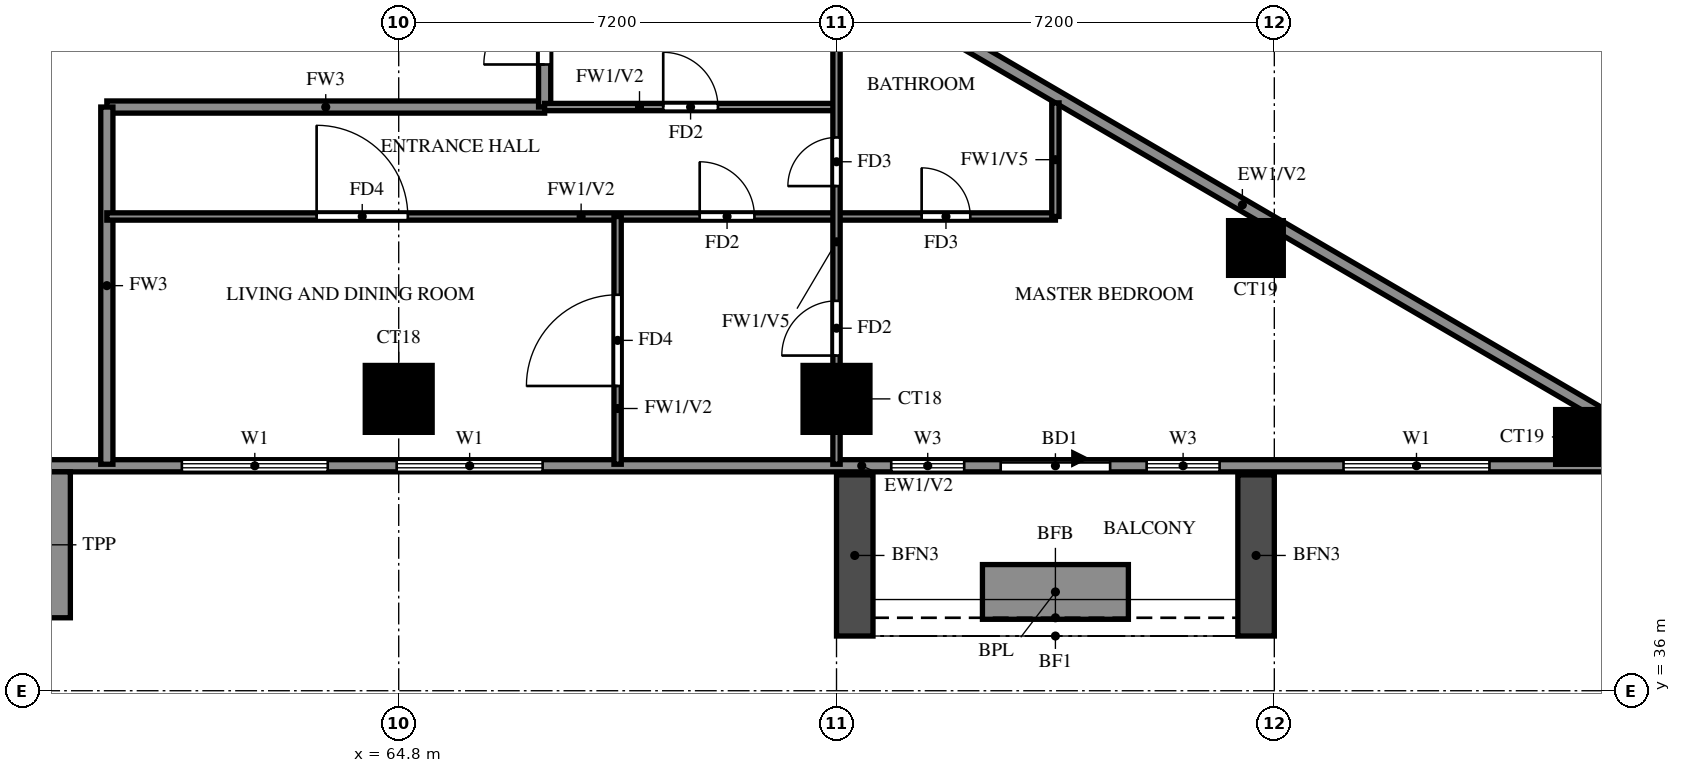
"""IFC4 building model, lengths in metres.
Left out: names, types, materials, properties, quantities, classifications, styles, units other than length and angle.
Written with IfcOpenShell. Run it as: python <this file> out.ifc"""

import sys

from ifc_helpers import new_model, si_unit, direction, frame, frame_2d, origin, origin_2d, place, context, subcontext, project, spatial, rectangle, extrude, source, transform, mapped, element, fill, save


model = new_model("IFC4")
c1 = context("Model", 3, precision=1e-05, world=origin(), true_north=direction((0.0, 1.0)))
c2 = subcontext(c1, "Body", "Model", "MODEL_VIEW")
j1 = project(units=[si_unit("LENGTHUNIT", "METRE"), si_unit("PLANEANGLEUNIT", "RADIAN")], contexts=[c1])
p1 = place(None, origin())
s1 = spatial("IfcSite", under=j1, at=p1, CompositionType="ELEMENT")
p2 = place(p1, origin())
s2 = spatial("IfcBuilding", under=s1, at=p2, CompositionType="ELEMENT")
p3 = place(p2, frame((0.0, 0.0, 127.0)))
s3 = spatial("IfcBuildingStorey", under=s2, at=p3, CompositionType="ELEMENT", Elevation=127.0)
m1 = source(origin(), c2, "Body", "SweptSolid", [
    extrude(rectangle(XDim=0.9, YDim=0.9, at=origin_2d()), origin(), (0.0, 0.0, 1.0), 3.2),
])
p4 = place(p3, frame((84.276, 40.174, 0.0), z_axis=(0.0, 0.0, 1.0), x_axis=(1.0, 0.0, 0.0)))
e1 = element("IfcColumn", 1, at=p4, inside=s3, PredefinedType="COLUMN", context=c2, shape_type="MappedRepresentation", body=[
    mapped(m1, transform((0.0, 0.0, 0.0))),
])
m2 = source(origin(), c2, "Body", "SweptSolid", [
    extrude(rectangle(XDim=1.1, YDim=1.1, at=origin_2d()), origin(), (0.0, 0.0, 1.0), 3.2),
])
for number, where, z_axis, x_axis in (
    (2, (64.8, 40.8, 0.0), (0.0, 0.0, 1.0), (1.0, 0.0, 0.0)),
    (3, (72.0, 40.8, 0.0), (0.0, 0.0, 1.0), (1.0, 0.0, 0.0)),
):
    element("IfcColumn", number, at=place(p3, frame(where, z_axis=z_axis, x_axis=x_axis)), inside=s3, PredefinedType="COLUMN", context=c2, shape_type="MappedRepresentation", body=[
        mapped(m2, transform((0.0, 0.0, 0.0))),
    ])
p5 = place(p3, frame((78.898, 43.282, 0.0), z_axis=(0.0, 0.0, 1.0), x_axis=(1.0, 0.0, 0.0)))
e4 = element("IfcColumn", 4, at=p5, inside=s3, PredefinedType="COLUMN", context=c2, shape_type="MappedRepresentation", body=[
    mapped(m1, transform((0.0, 0.0, 0.0))),
])
p6 = place(p3, frame((85.719, 39.881, 0.0), z_axis=(0.0, 0.0, 1.0), x_axis=(-0.86377618652, 0.503875678716, 0.0)))
e5 = element("IfcWall", 5, at=p6, inside=s3, PredefinedType="SOLIDWALL", context=c2, shape_type="SweptSolid", body=[
    extrude(rectangle(XDim=16.311, YDim=0.2, at=frame_2d((8.156, 0.0))), origin(), (0.0, 0.0, 1.0), 3.2),
])
p7 = place(p6, frame((13.326, 0.0, 1.5)))
e6 = element("IfcOpeningElement", 6, at=p7, cuts=e5, PredefinedType="OPENING", context=c2, shape_type="SweptSolid", body=[
    extrude(rectangle(XDim=0.9, YDim=0.9, at=frame_2d((0.45, 0.45))), frame((0.0, 0.11, 0.0), z_axis=(0.0, -1.0, 0.0), x_axis=(1.0, 0.0, 0.0)), (0.0, 0.0, 1.0), 0.22),
])
p8 = place(p3, frame((58.8, 39.7, 0.0), z_axis=(0.0, 0.0, 1.0), x_axis=(1.0, 0.0, 0.0)))
e7 = element("IfcWall", 7, at=p8, inside=s3, PredefinedType="SOLIDWALL", context=c2, shape_type="SweptSolid", body=[
    extrude(rectangle(XDim=27.23, YDim=0.2, at=frame_2d((13.615, 0.0))), origin(), (0.0, 0.0, 1.0), 3.2),
])
p9 = place(p8, frame((15.9, 0.0, 0.0)))
e8 = element("IfcOpeningElement", 8, at=p9, cuts=e7, PredefinedType="OPENING", context=c2, shape_type="SweptSolid", body=[
    extrude(rectangle(XDim=1.8, YDim=2.4, at=frame_2d((0.9, 1.2))), frame((0.0, 0.11, 0.0), z_axis=(0.0, -1.0, 0.0), x_axis=(1.0, 0.0, 0.0)), (0.0, 0.0, 1.0), 0.22),
])
p10 = place(p8, frame((2.433, 0.0, 0.6)))
e9 = element("IfcOpeningElement", 9, at=p10, cuts=e7, PredefinedType="OPENING", context=c2, shape_type="SweptSolid", body=[
    extrude(rectangle(XDim=2.4, YDim=2.4, at=frame_2d((1.2, 1.2))), frame((0.0, 0.11, 0.0), z_axis=(0.0, -1.0, 0.0), x_axis=(1.0, 0.0, 0.0)), (0.0, 0.0, 1.0), 0.22),
])
p11 = place(p8, frame((5.967, 0.0, 0.6)))
e10 = element("IfcOpeningElement", 10, at=p11, cuts=e7, PredefinedType="OPENING", context=c2, shape_type="SweptSolid", body=[
    extrude(rectangle(XDim=2.4, YDim=2.4, at=frame_2d((1.2, 1.2))), frame((0.0, 0.11, 0.0), z_axis=(0.0, -1.0, 0.0), x_axis=(1.0, 0.0, 0.0)), (0.0, 0.0, 1.0), 0.22),
])
p12 = place(p8, frame((14.1, 0.0, 0.6)))
e11 = element("IfcOpeningElement", 11, at=p12, cuts=e7, PredefinedType="OPENING", context=c2, shape_type="SweptSolid", body=[
    extrude(rectangle(XDim=1.2, YDim=2.4, at=frame_2d((0.6, 1.2))), frame((0.0, 0.11, 0.0), z_axis=(0.0, -1.0, 0.0), x_axis=(1.0, 0.0, 0.0)), (0.0, 0.0, 1.0), 0.22),
])
p13 = place(p8, frame((18.3, 0.0, 0.6)))
e12 = element("IfcOpeningElement", 12, at=p13, cuts=e7, PredefinedType="OPENING", context=c2, shape_type="SweptSolid", body=[
    extrude(rectangle(XDim=1.2, YDim=2.4, at=frame_2d((0.6, 1.2))), frame((0.0, 0.11, 0.0), z_axis=(0.0, -1.0, 0.0), x_axis=(1.0, 0.0, 0.0)), (0.0, 0.0, 1.0), 0.22),
])
p14 = place(p8, frame((21.538, 0.0, 0.6)))
e13 = element("IfcOpeningElement", 13, at=p14, cuts=e7, PredefinedType="OPENING", context=c2, shape_type="SweptSolid", body=[
    extrude(rectangle(XDim=2.4, YDim=2.4, at=frame_2d((1.2, 1.2))), frame((0.0, 0.11, 0.0), z_axis=(0.0, -1.0, 0.0), x_axis=(1.0, 0.0, 0.0)), (0.0, 0.0, 1.0), 0.22),
])
p15 = place(p8, frame((26.003, 0.0, 0.6)))
e14 = element("IfcOpeningElement", 14, at=p15, cuts=e7, PredefinedType="OPENING", context=c2, shape_type="SweptSolid", body=[
    extrude(rectangle(XDim=0.9, YDim=2.4, at=frame_2d((0.45, 1.2))), frame((0.0, 0.11, 0.0), z_axis=(0.0, -1.0, 0.0), x_axis=(1.0, 0.0, 0.0)), (0.0, 0.0, 1.0), 0.22),
])
for number, where, z_axis, x_axis in (
    (15, (72.3, 39.55, 0.0), (0.0, 0.0, 1.0), (0.0, -1.0, 0.0)),
    (16, (78.9, 39.55, 0.0), (0.0, 0.0, 1.0), (0.0, -1.0, 0.0)),
):
    element("IfcWall", number, at=place(p3, frame(where, z_axis=z_axis, x_axis=x_axis)), inside=s3, PredefinedType="SOLIDWALL", context=c2, shape_type="SweptSolid", body=[
        extrude(rectangle(XDim=2.65, YDim=0.6, at=frame_2d((1.325, 0.0))), origin(), (0.0, 0.0, 1.0), 2.85),
    ])
p16 = place(p3, frame((74.4, 37.625, 0.0), z_axis=(0.0, 0.0, 1.0), x_axis=(1.0, 0.0, 0.0)))
e17 = element("IfcWall", 17, at=p16, inside=s3, PredefinedType="SOLIDWALL", context=c2, shape_type="SweptSolid", body=[
    extrude(rectangle(XDim=2.4, YDim=0.9, at=frame_2d((1.2, 0.0))), origin(), (0.0, 0.0, 1.0), 0.9),
])
p17 = place(p3, frame((58.5, 37.2, -0.3), z_axis=(0.0, 0.0, 1.0), x_axis=(0.0, 1.0, 0.0)))
e18 = element("IfcWall", 18, at=p17, inside=s3, PredefinedType="SOLIDWALL", context=c2, shape_type="SweptSolid", body=[
    extrude(rectangle(XDim=2.4, YDim=1.8, at=frame_2d((1.2, 0.0))), origin(), (0.0, 0.0, 1.0), 3.5),
])
p18 = place(p3, frame((60.0, 45.6, 0.0), z_axis=(0.0, 0.0, 1.0), x_axis=(1.0, 0.0, 0.0)))
e19 = element("IfcWall", 19, at=p18, inside=s3, PredefinedType="SOLIDWALL", context=c2, shape_type="SweptSolid", body=[
    extrude(rectangle(XDim=7.2, YDim=0.2, at=frame_2d((3.6, 0.0))), origin(), (0.0, 0.0, 1.0), 3.2),
])
p19 = place(p3, frame((60.0, 39.725, 0.0), z_axis=(0.0, 0.0, 1.0), x_axis=(0.0, 1.0, 0.0)))
e20 = element("IfcWall", 20, at=p19, inside=s3, PredefinedType="SOLIDWALL", context=c2, shape_type="SweptSolid", body=[
    extrude(rectangle(XDim=5.875, YDim=0.2, at=frame_2d((2.938, 0.0))), origin(), (0.0, 0.0, 1.0), 3.2),
])
p20 = place(p3, frame((67.2, 45.6, 0.0), z_axis=(0.0, 0.0, 1.0), x_axis=(0.0, 1.0, 0.0)))
e21 = element("IfcWall", 21, at=p20, inside=s3, PredefinedType="SOLIDWALL", context=c2, shape_type="SweptSolid", body=[
    extrude(rectangle(XDim=8.4, YDim=0.2, at=frame_2d((4.2, 0.0))), origin(), (0.0, 0.0, 1.0), 3.2),
])
p21 = place(p20, frame((0.7, 0.0, 0.0)))
e22 = element("IfcOpeningElement", 22, at=p21, cuts=e21, PredefinedType="OPENING", context=c2, shape_type="SweptSolid", body=[
    extrude(rectangle(XDim=1.0, YDim=2.1, at=frame_2d((0.5, 1.05))), frame((0.0, 0.11, 0.0), z_axis=(0.0, -1.0, 0.0), x_axis=(1.0, 0.0, 0.0)), (0.0, 0.0, 1.0), 0.22),
])
p22 = place(p3, frame((60.0, 43.8, 0.0), z_axis=(0.0, 0.0, 1.0), x_axis=(1.0, 0.0, 0.0)))
e23 = element("IfcWall", 23, at=p22, inside=s3, PredefinedType="PARTITIONING", context=c2, shape_type="SweptSolid", body=[
    extrude(rectangle(XDim=15.6, YDim=0.12, at=frame_2d((7.8, 0.0))), origin(), (0.0, 0.0, 1.0), 3.2),
])
p23 = place(p22, frame((9.75, 0.0, 0.0)))
e24 = element("IfcOpeningElement", 24, at=p23, cuts=e23, PredefinedType="OPENING", context=c2, shape_type="SweptSolid", body=[
    extrude(rectangle(XDim=0.9, YDim=2.1, at=frame_2d((0.45, 1.05))), frame((0.0, 0.07, 0.0), z_axis=(0.0, -1.0, 0.0), x_axis=(1.0, 0.0, 0.0)), (0.0, 0.0, 1.0), 0.14),
])
p24 = place(p22, frame((3.45, 0.0, 0.0)))
e25 = element("IfcOpeningElement", 25, at=p24, cuts=e23, PredefinedType="OPENING", context=c2, shape_type="SweptSolid", body=[
    extrude(rectangle(XDim=1.5, YDim=2.1, at=frame_2d((0.75, 1.05))), frame((0.0, 0.07, 0.0), z_axis=(0.0, -1.0, 0.0), x_axis=(1.0, 0.0, 0.0)), (0.0, 0.0, 1.0), 0.14),
])
p25 = place(p22, frame((13.4, 0.0, 0.0)))
e26 = element("IfcOpeningElement", 26, at=p25, cuts=e23, PredefinedType="OPENING", context=c2, shape_type="SweptSolid", body=[
    extrude(rectangle(XDim=0.8, YDim=2.1, at=frame_2d((0.4, 1.05))), frame((0.0, 0.07, 0.0), z_axis=(0.0, -1.0, 0.0), x_axis=(1.0, 0.0, 0.0)), (0.0, 0.0, 1.0), 0.14),
])
p26 = place(p3, frame((67.2, 45.6, 0.0), z_axis=(0.0, 0.0, 1.0), x_axis=(1.0, 0.0, 0.0)))
e27 = element("IfcWall", 27, at=p26, inside=s3, PredefinedType="PARTITIONING", context=c2, shape_type="SweptSolid", body=[
    extrude(rectangle(XDim=4.8, YDim=0.12, at=frame_2d((2.4, 0.0))), origin(), (0.0, 0.0, 1.0), 3.2),
])
p27 = place(p26, frame((1.95, 0.0, 0.0)))
e28 = element("IfcOpeningElement", 28, at=p27, cuts=e27, PredefinedType="OPENING", context=c2, shape_type="SweptSolid", body=[
    extrude(rectangle(XDim=0.9, YDim=2.1, at=frame_2d((0.45, 1.05))), frame((0.0, 0.07, 0.0), z_axis=(0.0, -1.0, 0.0), x_axis=(1.0, 0.0, 0.0)), (0.0, 0.0, 1.0), 0.14),
])
p28 = place(p3, frame((68.4, 39.725, 0.0), z_axis=(0.0, 0.0, 1.0), x_axis=(0.0, 1.0, 0.0)))
e29 = element("IfcWall", 29, at=p28, inside=s3, PredefinedType="PARTITIONING", context=c2, shape_type="SweptSolid", body=[
    extrude(rectangle(XDim=4.075, YDim=0.12, at=frame_2d((2.038, 0.0))), origin(), (0.0, 0.0, 1.0), 3.2),
])
p29 = place(p28, frame((1.288, 0.0, 0.0)))
e30 = element("IfcOpeningElement", 30, at=p29, cuts=e29, PredefinedType="OPENING", context=c2, shape_type="SweptSolid", body=[
    extrude(rectangle(XDim=1.5, YDim=2.1, at=frame_2d((0.75, 1.05))), frame((0.0, 0.07, 0.0), z_axis=(0.0, -1.0, 0.0), x_axis=(1.0, 0.0, 0.0)), (0.0, 0.0, 1.0), 0.14),
])
p30 = place(p3, frame((72.0, 39.725, 0.0), z_axis=(0.0, 0.0, 1.0), x_axis=(0.0, 1.0, 0.0)))
e31 = element("IfcWall", 31, at=p30, inside=s3, PredefinedType="PARTITIONING", context=c2, shape_type="SweptSolid", body=[
    extrude(rectangle(XDim=8.13, YDim=0.12, at=frame_2d((4.065, 0.0))), origin(), (0.0, 0.0, 1.0), 2.3),
])
p31 = place(p30, frame((1.788, 0.0, 0.0)))
e32 = element("IfcOpeningElement", 32, at=p31, cuts=e31, PredefinedType="OPENING", context=c2, shape_type="SweptSolid", body=[
    extrude(rectangle(XDim=0.9, YDim=2.1, at=frame_2d((0.45, 1.05))), frame((0.0, 0.07, 0.0), z_axis=(0.0, -1.0, 0.0), x_axis=(1.0, 0.0, 0.0)), (0.0, 0.0, 1.0), 0.14),
])
p32 = place(p30, frame((4.575, 0.0, 0.0)))
e33 = element("IfcOpeningElement", 33, at=p32, cuts=e31, PredefinedType="OPENING", context=c2, shape_type="SweptSolid", body=[
    extrude(rectangle(XDim=0.8, YDim=2.1, at=frame_2d((0.4, 1.05))), frame((0.0, 0.07, 0.0), z_axis=(0.0, -1.0, 0.0), x_axis=(1.0, 0.0, 0.0)), (0.0, 0.0, 1.0), 0.14),
])
p33 = place(p3, frame((75.6, 43.8, 0.0), z_axis=(0.0, 0.0, 1.0), x_axis=(0.0, 1.0, 0.0)))
e34 = element("IfcWall", 34, at=p33, inside=s3, PredefinedType="PARTITIONING", context=c2, shape_type="SweptSolid", body=[
    extrude(rectangle(XDim=1.868, YDim=0.12, at=frame_2d((0.934, 0.0))), origin(), (0.0, 0.0, 1.0), 2.3),
])
p34 = place(p9, origin())
e35 = element("IfcDoor", 35, at=p34, inside=s3, OperationType="DOUBLE_DOOR_SLIDING", PredefinedType="DOOR", context=c2, shape_type="SweptSolid", body=[
    extrude(rectangle(XDim=1.8, YDim=2.4, at=frame_2d((0.9, 1.2))), frame((0.0, 0.025, 0.0), z_axis=(0.0, -1.0, 0.0), x_axis=(1.0, 0.0, 0.0)), (0.0, 0.0, 1.0), 0.05),
])
fill(e8, e35)
p35 = place(p10, origin())
e36 = element("IfcWindow", 36, at=p35, inside=s3, PartitioningType="DOUBLE_PANEL_VERTICAL", PredefinedType="WINDOW", context=c2, shape_type="SweptSolid", body=[
    extrude(rectangle(XDim=2.4, YDim=2.4, at=frame_2d((1.2, 1.2))), frame((0.0, 0.03, 0.0), z_axis=(0.0, -1.0, 0.0), x_axis=(1.0, 0.0, 0.0)), (0.0, 0.0, 1.0), 0.06),
])
fill(e9, e36)
p36 = place(p11, origin())
e37 = element("IfcWindow", 37, at=p36, inside=s3, PartitioningType="DOUBLE_PANEL_VERTICAL", PredefinedType="WINDOW", context=c2, shape_type="SweptSolid", body=[
    extrude(rectangle(XDim=2.4, YDim=2.4, at=frame_2d((1.2, 1.2))), frame((0.0, 0.03, 0.0), z_axis=(0.0, -1.0, 0.0), x_axis=(1.0, 0.0, 0.0)), (0.0, 0.0, 1.0), 0.06),
])
fill(e10, e37)
p37 = place(p12, origin())
e38 = element("IfcWindow", 38, at=p37, inside=s3, PartitioningType="SINGLE_PANEL", PredefinedType="WINDOW", context=c2, shape_type="SweptSolid", body=[
    extrude(rectangle(XDim=1.2, YDim=2.4, at=frame_2d((0.6, 1.2))), frame((0.0, 0.03, 0.0), z_axis=(0.0, -1.0, 0.0), x_axis=(1.0, 0.0, 0.0)), (0.0, 0.0, 1.0), 0.06),
])
fill(e11, e38)
p38 = place(p13, origin())
e39 = element("IfcWindow", 39, at=p38, inside=s3, PartitioningType="SINGLE_PANEL", PredefinedType="WINDOW", context=c2, shape_type="SweptSolid", body=[
    extrude(rectangle(XDim=1.2, YDim=2.4, at=frame_2d((0.6, 1.2))), frame((0.0, 0.03, 0.0), z_axis=(0.0, -1.0, 0.0), x_axis=(1.0, 0.0, 0.0)), (0.0, 0.0, 1.0), 0.06),
])
fill(e12, e39)
p39 = place(p14, origin())
e40 = element("IfcWindow", 40, at=p39, inside=s3, PartitioningType="DOUBLE_PANEL_VERTICAL", PredefinedType="WINDOW", context=c2, shape_type="SweptSolid", body=[
    extrude(rectangle(XDim=2.4, YDim=2.4, at=frame_2d((1.2, 1.2))), frame((0.0, 0.03, 0.0), z_axis=(0.0, -1.0, 0.0), x_axis=(1.0, 0.0, 0.0)), (0.0, 0.0, 1.0), 0.06),
])
fill(e13, e40)
p40 = place(p29, origin())
e41 = element("IfcDoor", 41, at=p40, inside=s3, OperationType="SINGLE_SWING_LEFT", PredefinedType="DOOR", context=c2, shape_type="SweptSolid", body=[
    extrude(rectangle(XDim=1.5, YDim=2.1, at=frame_2d((0.75, 1.05))), frame((0.0, 0.025, 0.0), z_axis=(0.0, -1.0, 0.0), x_axis=(1.0, 0.0, 0.0)), (0.0, 0.0, 1.0), 0.05),
])
fill(e30, e41)
p41 = place(p27, origin())
e42 = element("IfcDoor", 42, at=p41, inside=s3, OperationType="SINGLE_SWING_LEFT", PredefinedType="DOOR", context=c2, shape_type="SweptSolid", body=[
    extrude(rectangle(XDim=0.9, YDim=2.1, at=frame_2d((0.45, 1.05))), frame((0.0, 0.025, 0.0), z_axis=(0.0, -1.0, 0.0), x_axis=(1.0, 0.0, 0.0)), (0.0, 0.0, 1.0), 0.05),
])
fill(e28, e42)
p42 = place(p21, origin())
e43 = element("IfcDoor", 43, at=p42, inside=s3, OperationType="SINGLE_SWING_RIGHT", PredefinedType="DOOR", context=c2, shape_type="SweptSolid", body=[
    extrude(rectangle(XDim=1.0, YDim=2.1, at=frame_2d((0.5, 1.05))), frame((0.0, 0.025, 0.0), z_axis=(0.0, -1.0, 0.0), x_axis=(1.0, 0.0, 0.0)), (0.0, 0.0, 1.0), 0.05),
])
fill(e22, e43)
p43 = place(p23, origin())
e44 = element("IfcDoor", 44, at=p43, inside=s3, OperationType="SINGLE_SWING_LEFT", PredefinedType="DOOR", context=c2, shape_type="SweptSolid", body=[
    extrude(rectangle(XDim=0.9, YDim=2.1, at=frame_2d((0.45, 1.05))), frame((0.0, 0.025, 0.0), z_axis=(0.0, -1.0, 0.0), x_axis=(1.0, 0.0, 0.0)), (0.0, 0.0, 1.0), 0.05),
])
fill(e24, e44)
p44 = place(p24, origin())
e45 = element("IfcDoor", 45, at=p44, inside=s3, OperationType="SINGLE_SWING_LEFT", PredefinedType="DOOR", context=c2, shape_type="SweptSolid", body=[
    extrude(rectangle(XDim=1.5, YDim=2.1, at=frame_2d((0.75, 1.05))), frame((0.0, 0.025, 0.0), z_axis=(0.0, -1.0, 0.0), x_axis=(1.0, 0.0, 0.0)), (0.0, 0.0, 1.0), 0.05),
])
fill(e25, e45)
p45 = place(p31, origin())
e46 = element("IfcDoor", 46, at=p45, inside=s3, OperationType="SINGLE_SWING_LEFT", PredefinedType="DOOR", context=c2, shape_type="SweptSolid", body=[
    extrude(rectangle(XDim=0.9, YDim=2.1, at=frame_2d((0.45, 1.05))), frame((0.0, 0.025, 0.0), z_axis=(0.0, -1.0, 0.0), x_axis=(1.0, 0.0, 0.0)), (0.0, 0.0, 1.0), 0.05),
])
fill(e32, e46)
p46 = place(p32, origin())
e47 = element("IfcDoor", 47, at=p46, inside=s3, OperationType="SINGLE_SWING_LEFT", PredefinedType="DOOR", context=c2, shape_type="SweptSolid", body=[
    extrude(rectangle(XDim=0.8, YDim=2.1, at=frame_2d((0.4, 1.05))), frame((0.0, 0.025, 0.0), z_axis=(0.0, -1.0, 0.0), x_axis=(1.0, 0.0, 0.0)), (0.0, 0.0, 1.0), 0.05),
])
fill(e33, e47)
p47 = place(p25, origin())
e48 = element("IfcDoor", 48, at=p47, inside=s3, OperationType="SINGLE_SWING_LEFT", PredefinedType="DOOR", context=c2, shape_type="SweptSolid", body=[
    extrude(rectangle(XDim=0.8, YDim=2.1, at=frame_2d((0.4, 1.05))), frame((0.0, 0.025, 0.0), z_axis=(0.0, -1.0, 0.0), x_axis=(1.0, 0.0, 0.0)), (0.0, 0.0, 1.0), 0.05),
])
fill(e26, e48)
save(model, sys.argv[1])
